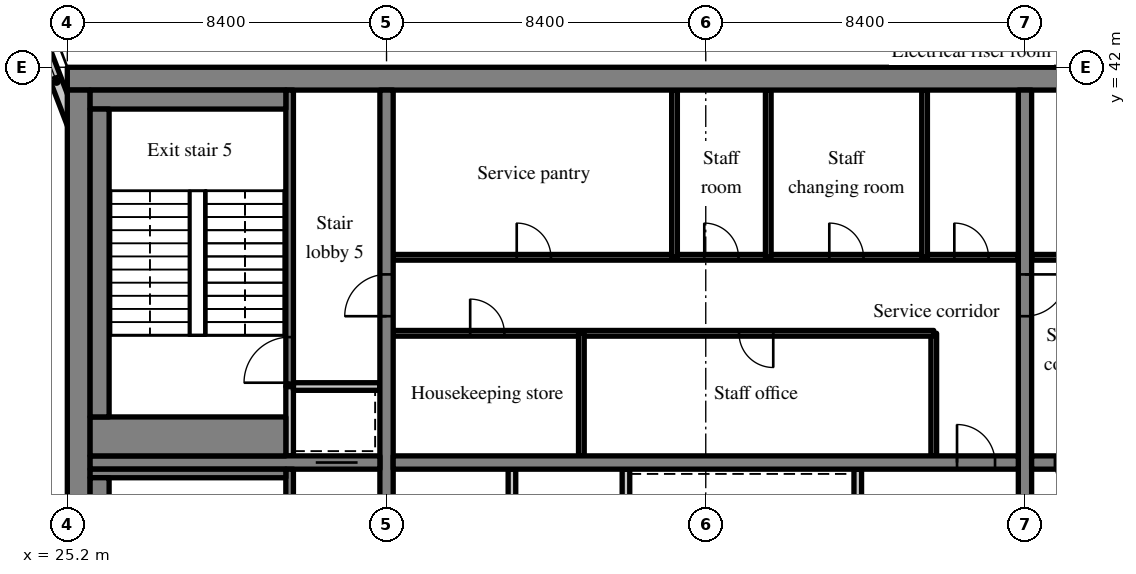
"""IFC4 building model, lengths in metres.
Left out: names, types, materials, properties, quantities, classifications, styles, units other than length and angle.
Written with IfcOpenShell. Run it as: python <this file> out.ifc"""

import sys

from ifc_helpers import new_model, si_unit, direction, frame, frame_2d, origin, place, context, subcontext, project, spatial, rectangle, extrude, source, transform, mapped, element, fill, save


model = new_model("IFC4")
c1 = context("Model", 3, precision=1e-05, world=origin(), true_north=direction((0.0, 1.0)))
c2 = subcontext(c1, "Body", "Model", "MODEL_VIEW")
j1 = project(units=[si_unit("LENGTHUNIT", "METRE"), si_unit("PLANEANGLEUNIT", "RADIAN")], contexts=[c1])
p1 = place(None, origin())
s1 = spatial("IfcSite", under=j1, at=p1, CompositionType="ELEMENT")
p2 = place(p1, origin())
s2 = spatial("IfcBuilding", under=s1, at=p2, CompositionType="ELEMENT")
p3 = place(p2, frame((0.0, 0.0, 221.8)))
s3 = spatial("IfcBuildingStorey", under=s2, at=p3, CompositionType="ELEMENT", Elevation=221.8)
m1 = source(origin(), c2, "Body", "SweptSolid", [
    extrude(rectangle(XDim=50.4, YDim=0.6, at=frame_2d((25.2, 0.0))), origin(), (0.0, 0.0, 1.0), 3.62),
])
p4 = place(p3, frame((25.2, 41.7, 0.0), z_axis=(0.0, 0.0, 1.0), x_axis=(1.0, 0.0, 0.0)))
e1 = element("IfcWall", 1, at=p4, inside=s3, PredefinedType="SHEAR", context=c2, shape_type="MappedRepresentation", body=[
    mapped(m1, transform((0.0, 0.0, 0.0), scale=1.0)),
])
m2 = source(origin(), c2, "Body", "SweptSolid", [
    extrude(rectangle(XDim=18.8, YDim=0.6, at=frame_2d((9.4, 0.0))), origin(), (0.0, 0.0, 1.0), 3.62),
])
p5 = place(p3, frame((25.5, 22.6, 0.0), z_axis=(0.0, 0.0, 1.0), x_axis=(0.0, 1.0, 0.0)))
e2 = element("IfcWall", 2, at=p5, inside=s3, PredefinedType="SHEAR", context=c2, shape_type="MappedRepresentation", body=[
    mapped(m2, transform((0.0, 0.0, 0.0), scale=1.0)),
])
m3 = source(origin(), c2, "Body", "SweptSolid", [
    extrude(rectangle(XDim=18.8, YDim=0.35, at=frame_2d((9.4, 0.0))), origin(), (0.0, 0.0, 1.0), 3.62),
])
p6 = place(p3, frame((33.6, 22.6, 0.0), z_axis=(0.0, 0.0, 1.0), x_axis=(0.0, 1.0, 0.0)))
e3 = element("IfcWall", 3, at=p6, inside=s3, PredefinedType="SHEAR", context=c2, shape_type="MappedRepresentation", body=[
    mapped(m3, transform((0.0, 0.0, 0.0), scale=1.0)),
])
m4 = source(origin(), c2, "Body", "SweptSolid", [
    extrude(rectangle(XDim=1.1, YDim=2.1, at=frame_2d((0.55, 1.05))), frame((0.0, 0.185, 0.0), z_axis=(0.0, -1.0, 0.0), x_axis=(1.0, 0.0, 0.0)), (0.0, 0.0, 1.0), 0.37),
])
p7 = place(p6, frame((12.85, 0.0, 0.0)))
e4 = element("IfcOpeningElement", 4, at=p7, cuts=e3, PredefinedType="OPENING", context=c2, shape_type="MappedRepresentation", body=[
    mapped(m4, transform((0.0, 0.0, 0.0), scale=1.0)),
])
p8 = place(p3, frame((50.4, 22.6, 0.0), z_axis=(0.0, 0.0, 1.0), x_axis=(0.0, 1.0, 0.0)))
e5 = element("IfcWall", 5, at=p8, inside=s3, PredefinedType="SHEAR", context=c2, shape_type="MappedRepresentation", body=[
    mapped(m3, transform((0.0, 0.0, 0.0), scale=1.0)),
])
p9 = place(p8, frame((12.85, 0.0, 0.0)))
e6 = element("IfcOpeningElement", 6, at=p9, cuts=e5, PredefinedType="OPENING", context=c2, shape_type="MappedRepresentation", body=[
    mapped(m4, transform((0.0, 0.0, 0.0), scale=1.0)),
])
m5 = source(origin(), c2, "Body", "SweptSolid", [
    extrude(rectangle(XDim=7.625, YDim=0.35, at=frame_2d((3.812, 0.0))), origin(), (0.0, 0.0, 1.0), 3.62),
])
p10 = place(p3, frame((25.8, 31.6, 0.0), z_axis=(0.0, 0.0, 1.0), x_axis=(1.0, 0.0, 0.0)))
e7 = element("IfcWall", 7, at=p10, inside=s3, PredefinedType="SHEAR", context=c2, shape_type="MappedRepresentation", body=[
    mapped(m5, transform((0.0, 0.0, 0.0), scale=1.0)),
])
p11 = place(p10, frame((5.938, 0.0, 0.0)))
e8 = element("IfcOpeningElement", 8, at=p11, cuts=e7, PredefinedType="OPENING", context=c2, shape_type="MappedRepresentation", body=[
    mapped(m4, transform((0.0, 0.0, 0.0), scale=1.0)),
])
m6 = source(origin(), c2, "Body", "SweptSolid", [
    extrude(rectangle(XDim=16.45, YDim=0.35, at=frame_2d((8.225, 0.0))), origin(), (0.0, 0.0, 1.0), 3.62),
])
p12 = place(p3, frame((33.775, 31.6, 0.0), z_axis=(0.0, 0.0, 1.0), x_axis=(1.0, 0.0, 0.0)))
e9 = element("IfcWall", 9, at=p12, inside=s3, PredefinedType="SHEAR", context=c2, shape_type="MappedRepresentation", body=[
    mapped(m6, transform((0.0, 0.0, 0.0), scale=1.0)),
])
m7 = source(origin(), c2, "Body", "SweptSolid", [
    extrude(rectangle(XDim=1.0, YDim=2.1, at=frame_2d((0.5, 1.05))), frame((0.0, 0.185, 0.0), z_axis=(0.0, -1.0, 0.0), x_axis=(1.0, 0.0, 0.0)), (0.0, 0.0, 1.0), 0.37),
])
p13 = place(p12, frame((14.837, 0.0, 0.0)))
e10 = element("IfcOpeningElement", 10, at=p13, cuts=e9, PredefinedType="OPENING", context=c2, shape_type="MappedRepresentation", body=[
    mapped(m7, transform((0.0, 0.0, 0.0), scale=1.0)),
])
m8 = source(origin(), c2, "Body", "SweptSolid", [
    extrude(rectangle(XDim=16.45, YDim=0.35, at=frame_2d((8.225, 0.0))), origin(), (0.0, 0.0, 1.0), 3.62),
])
p14 = place(p3, frame((50.575, 31.6, 0.0), z_axis=(0.0, 0.0, 1.0), x_axis=(1.0, 0.0, 0.0)))
e11 = element("IfcWall", 11, at=p14, inside=s3, PredefinedType="SHEAR", context=c2, shape_type="MappedRepresentation", body=[
    mapped(m8, transform((0.0, 0.0, 0.0), scale=1.0)),
])
p15 = place(p14, frame((0.613, 0.0, 0.0)))
e12 = element("IfcOpeningElement", 12, at=p15, cuts=e11, PredefinedType="OPENING", context=c2, shape_type="MappedRepresentation", body=[
    mapped(m7, transform((0.0, 0.0, 0.0), scale=1.0)),
])
m9 = source(origin(), c2, "Body", "SweptSolid", [
    extrude(rectangle(XDim=3.559, YDim=0.3, at=frame_2d((1.78, 0.0))), origin(), (0.0, 0.0, 1.0), 3.62),
])
p16 = place(p3, frame((25.55, 39.969, 0.0), z_axis=(0.0, 0.0, 1.0), x_axis=(-0.35779745313, 0.933799219604, 0.0)))
e13 = element("IfcWall", 13, at=p16, inside=s3, PredefinedType="SOLIDWALL", context=c2, shape_type="MappedRepresentation", body=[
    mapped(m9, transform((0.0, 0.0, 0.0), scale=1.0)),
])
m10 = source(origin(), c2, "Body", "SweptSolid", [
    extrude(rectangle(XDim=1.5, YDim=2.0, at=frame_2d((0.75, 1.0))), frame((0.0, 0.16, 0.0), z_axis=(0.0, -1.0, 0.0), x_axis=(1.0, 0.0, 0.0)), (0.0, 0.0, 1.0), 0.32),
])
p17 = place(p16, frame((1.903, 0.0, 0.9)))
e14 = element("IfcOpeningElement", 14, at=p17, cuts=e13, PredefinedType="OPENING", context=c2, shape_type="MappedRepresentation", body=[
    mapped(m10, transform((0.0, 0.0, 0.0), scale=1.0)),
])
m11 = source(origin(), c2, "Body", "SweptSolid", [
    extrude(rectangle(XDim=8.825, YDim=0.2, at=frame_2d((4.413, 0.0))), origin(), (0.0, 0.0, 1.0), 3.62),
])
p18 = place(p3, frame((39.9, 22.6, 0.0), z_axis=(0.0, 0.0, 1.0), x_axis=(0.0, 1.0, 0.0)))
e15 = element("IfcWall", 15, at=p18, inside=s3, PredefinedType="PARTITIONING", context=c2, shape_type="MappedRepresentation", body=[
    mapped(m11, transform((0.0, 0.0, 0.0), scale=1.0)),
])
m12 = source(origin(), c2, "Body", "SweptSolid", [
    extrude(rectangle(XDim=0.9, YDim=2.1, at=frame_2d((0.45, 1.05))), frame((0.0, 0.11, 0.0), z_axis=(0.0, -1.0, 0.0), x_axis=(1.0, 0.0, 0.0)), (0.0, 0.0, 1.0), 0.22),
])
p19 = place(p18, frame((3.95, 0.0, 0.0)))
e16 = element("IfcOpeningElement", 16, at=p19, cuts=e15, PredefinedType="OPENING", context=c2, shape_type="MappedRepresentation", body=[
    mapped(m12, transform((0.0, 0.0, 0.0), scale=1.0)),
])
m13 = source(origin(), c2, "Body", "SweptSolid", [
    extrude(rectangle(XDim=2.625, YDim=0.2, at=frame_2d((1.312, 0.0))), origin(), (0.0, 0.0, 1.0), 3.62),
])
p20 = place(p3, frame((46.0, 28.8, 0.0), z_axis=(0.0, 0.0, 1.0), x_axis=(0.0, 1.0, 0.0)))
e17 = element("IfcWall", 17, at=p20, inside=s3, PredefinedType="SOLIDWALL", context=c2, shape_type="MappedRepresentation", body=[
    mapped(m13, transform((0.0, 0.0, 0.0), scale=1.0)),
])
p21 = place(p3, frame((36.9, 22.6, 0.0), z_axis=(0.0, 0.0, 1.0), x_axis=(0.0, 1.0, 0.0)))
e18 = element("IfcWall", 18, at=p21, inside=s3, PredefinedType="PARTITIONING", context=c2, shape_type="MappedRepresentation", body=[
    mapped(m11, transform((0.0, 0.0, 0.0), scale=1.0)),
])
m14 = source(origin(), c2, "Body", "SweptSolid", [
    extrude(rectangle(XDim=3.225, YDim=0.15, at=frame_2d((1.613, 0.0))), origin(), (0.0, 0.0, 1.0), 3.62),
])
p22 = place(p3, frame((48.0, 31.775, 0.0), z_axis=(0.0, 0.0, 1.0), x_axis=(0.0, 1.0, 0.0)))
e19 = element("IfcWall", 19, at=p22, inside=s3, PredefinedType="PARTITIONING", context=c2, shape_type="MappedRepresentation", body=[
    mapped(m14, transform((0.0, 0.0, 0.0), scale=1.0)),
])
m15 = source(origin(), c2, "Body", "SweptSolid", [
    extrude(rectangle(XDim=14.225, YDim=0.15, at=frame_2d((7.113, 0.0))), origin(), (0.0, 0.0, 1.0), 3.62),
])
p23 = place(p3, frame((33.775, 35.0, 0.0), z_axis=(0.0, 0.0, 1.0), x_axis=(1.0, 0.0, 0.0)))
e20 = element("IfcWall", 20, at=p23, inside=s3, PredefinedType="PARTITIONING", context=c2, shape_type="MappedRepresentation", body=[
    mapped(m15, transform((0.0, 0.0, 0.0), scale=1.0)),
])
m16 = source(origin(), c2, "Body", "SweptSolid", [
    extrude(rectangle(XDim=0.9, YDim=2.1, at=frame_2d((0.45, 1.05))), frame((0.0, 0.085, 0.0), z_axis=(0.0, -1.0, 0.0), x_axis=(1.0, 0.0, 0.0)), (0.0, 0.0, 1.0), 0.17),
])
p24 = place(p23, frame((2.026, 0.0, 0.0)))
e21 = element("IfcOpeningElement", 21, at=p24, cuts=e20, PredefinedType="OPENING", context=c2, shape_type="MappedRepresentation", body=[
    mapped(m16, transform((0.0, 0.0, 0.0), scale=1.0)),
])
p25 = place(p23, frame((9.101, 0.0, 0.0)))
e22 = element("IfcOpeningElement", 22, at=p25, cuts=e20, PredefinedType="OPENING", context=c2, shape_type="MappedRepresentation", body=[
    mapped(m16, transform((0.0, 0.0, 0.0), scale=1.0)),
])
m17 = source(origin(), c2, "Body", "SweptSolid", [
    extrude(rectangle(XDim=16.45, YDim=0.15, at=frame_2d((8.225, 0.0))), origin(), (0.0, 0.0, 1.0), 3.62),
])
p26 = place(p3, frame((33.775, 37.0, 0.0), z_axis=(0.0, 0.0, 1.0), x_axis=(1.0, 0.0, 0.0)))
e23 = element("IfcWall", 23, at=p26, inside=s3, PredefinedType="PARTITIONING", context=c2, shape_type="MappedRepresentation", body=[
    mapped(m17, transform((0.0, 0.0, 0.0), scale=1.0)),
])
p27 = place(p26, frame((3.251, 0.0, 0.0)))
e24 = element("IfcOpeningElement", 24, at=p27, cuts=e23, PredefinedType="OPENING", context=c2, shape_type="MappedRepresentation", body=[
    mapped(m16, transform((0.0, 0.0, 0.0), scale=1.0)),
])
p28 = place(p26, frame((8.186, 0.0, 0.0)))
e25 = element("IfcOpeningElement", 25, at=p28, cuts=e23, PredefinedType="OPENING", context=c2, shape_type="MappedRepresentation", body=[
    mapped(m16, transform((0.0, 0.0, 0.0), scale=1.0)),
])
p29 = place(p26, frame((11.476, 0.0, 0.0)))
e26 = element("IfcOpeningElement", 26, at=p29, cuts=e23, PredefinedType="OPENING", context=c2, shape_type="MappedRepresentation", body=[
    mapped(m16, transform((0.0, 0.0, 0.0), scale=1.0)),
])
p30 = place(p26, frame((14.766, 0.0, 0.0)))
e27 = element("IfcOpeningElement", 27, at=p30, cuts=e23, PredefinedType="OPENING", context=c2, shape_type="MappedRepresentation", body=[
    mapped(m16, transform((0.0, 0.0, 0.0), scale=1.0)),
])
p31 = place(p3, frame((38.727, 31.775, 0.0), z_axis=(0.0, 0.0, 1.0), x_axis=(0.0, 1.0, 0.0)))
e28 = element("IfcWall", 28, at=p31, inside=s3, PredefinedType="PARTITIONING", context=c2, shape_type="MappedRepresentation", body=[
    mapped(m14, transform((0.0, 0.0, 0.0), scale=1.0)),
])
m18 = source(origin(), c2, "Body", "SweptSolid", [
    extrude(rectangle(XDim=4.4, YDim=0.15, at=frame_2d((2.2, 0.0))), origin(), (0.0, 0.0, 1.0), 3.62),
])
for number, where, z_axis, x_axis in (
    (29, (41.178, 37.0, 0.0), (0.0, 0.0, 1.0), (0.0, 1.0, 0.0)),
    (30, (43.645, 37.0, 0.0), (0.0, 0.0, 1.0), (0.0, 1.0, 0.0)),
    (31, (47.758, 37.0, 0.0), (0.0, 0.0, 1.0), (0.0, 1.0, 0.0)),
):
    element("IfcWall", number, at=place(p3, frame(where, z_axis=z_axis, x_axis=x_axis)), inside=s3, PredefinedType="PARTITIONING", context=c2, shape_type="MappedRepresentation", body=[
        mapped(m18, transform((0.0, 0.0, 0.0), scale=1.0)),
    ])
m19 = source(origin(), c2, "Body", "SweptSolid", [
    extrude(rectangle(XDim=16.45, YDim=0.15, at=frame_2d((8.225, 0.0))), origin(), (0.0, 0.0, 1.0), 3.62),
])
p32 = place(p3, frame((67.025, 37.0, 0.0), z_axis=(0.0, 0.0, 1.0), x_axis=(-1.0, 0.0, 0.0)))
e32 = element("IfcWall", 32, at=p32, inside=s3, PredefinedType="PARTITIONING", context=c2, shape_type="MappedRepresentation", body=[
    mapped(m19, transform((0.0, 0.0, 0.0), scale=1.0)),
])
p33 = place(p32, frame((0.784, 0.0, 0.0)))
e33 = element("IfcOpeningElement", 33, at=p33, cuts=e32, PredefinedType="OPENING", context=c2, shape_type="MappedRepresentation", body=[
    mapped(m16, transform((0.0, 0.0, 0.0), scale=1.0)),
])
p34 = place(p32, frame((3.663, 0.0, 0.0)))
e34 = element("IfcOpeningElement", 34, at=p34, cuts=e32, PredefinedType="OPENING", context=c2, shape_type="MappedRepresentation", body=[
    mapped(m16, transform((0.0, 0.0, 0.0), scale=1.0)),
])
p35 = place(p32, frame((9.42, 0.0, 0.0)))
e35 = element("IfcOpeningElement", 35, at=p35, cuts=e32, PredefinedType="OPENING", context=c2, shape_type="MappedRepresentation", body=[
    mapped(m16, transform((0.0, 0.0, 0.0), scale=1.0)),
])
p36 = place(p32, frame((14.766, 0.0, 0.0)))
e36 = element("IfcOpeningElement", 36, at=p36, cuts=e32, PredefinedType="OPENING", context=c2, shape_type="MappedRepresentation", body=[
    mapped(m16, transform((0.0, 0.0, 0.0), scale=1.0)),
])
m20 = source(origin(), c2, "Body", "SweptSolid", [
    extrude(rectangle(XDim=8.825, YDim=0.2, at=frame_2d((4.413, 0.0))), origin(), (0.0, 0.0, 1.0), 3.62),
])
p37 = place(p3, frame((31.05, 22.6, 0.0), z_axis=(0.0, 0.0, 1.0), x_axis=(0.0, 1.0, 0.0)))
e37 = element("IfcWall", 37, at=p37, inside=s3, PredefinedType="SOLIDWALL", context=c2, shape_type="MappedRepresentation", body=[
    mapped(m20, transform((0.0, 0.0, 0.0), scale=1.0)),
])
m21 = source(origin(), c2, "Body", "SweptSolid", [
    extrude(rectangle(XDim=1.2, YDim=2.1, at=frame_2d((0.6, 1.05))), frame((0.0, 0.11, 0.0), z_axis=(0.0, -1.0, 0.0), x_axis=(1.0, 0.0, 0.0)), (0.0, 0.0, 1.0), 0.22),
])
p38 = place(p37, frame((1.0, 0.0, 0.0)))
e38 = element("IfcOpeningElement", 38, at=p38, cuts=e37, PredefinedType="OPENING", context=c2, shape_type="MappedRepresentation", body=[
    mapped(m21, transform((0.0, 0.0, 0.0), scale=1.0)),
])
m22 = source(origin(), c2, "Body", "SweptSolid", [
    extrude(rectangle(XDim=1.825, YDim=0.2, at=frame_2d((0.913, 0.0))), origin(), (0.0, 0.0, 1.0), 3.62),
])
p39 = place(p3, frame((31.05, 31.775, 0.0), z_axis=(0.0, 0.0, 1.0), x_axis=(0.0, 1.0, 0.0)))
e39 = element("IfcWall", 39, at=p39, inside=s3, PredefinedType="SOLIDWALL", context=c2, shape_type="MappedRepresentation", body=[
    mapped(m22, transform((0.0, 0.0, 0.0), scale=1.0)),
])
m23 = source(origin(), c2, "Body", "SweptSolid", [
    extrude(rectangle(XDim=2.275, YDim=0.2, at=frame_2d((1.138, 0.0))), origin(), (0.0, 0.0, 1.0), 3.62),
])
p40 = place(p3, frame((31.15, 33.6, 0.0), z_axis=(0.0, 0.0, 1.0), x_axis=(1.0, 0.0, 0.0)))
e40 = element("IfcWall", 40, at=p40, inside=s3, PredefinedType="SOLIDWALL", context=c2, shape_type="MappedRepresentation", body=[
    mapped(m23, transform((0.0, 0.0, 0.0), scale=1.0)),
])
m24 = source(origin(), c2, "Body", "SweptSolid", [
    extrude(rectangle(XDim=7.8, YDim=0.2, at=frame_2d((3.9, 0.0))), origin(), (0.0, 0.0, 1.0), 3.62),
])
p41 = place(p3, frame((31.05, 33.6, 0.0), z_axis=(0.0, 0.0, 1.0), x_axis=(0.0, 1.0, 0.0)))
e41 = element("IfcWall", 41, at=p41, inside=s3, PredefinedType="SOLIDWALL", context=c2, shape_type="MappedRepresentation", body=[
    mapped(m24, transform((0.0, 0.0, 0.0), scale=1.0)),
])
p42 = place(p41, frame((0.1, 0.0, 0.0)))
e42 = element("IfcOpeningElement", 42, at=p42, cuts=e41, PredefinedType="OPENING", context=c2, shape_type="MappedRepresentation", body=[
    mapped(m21, transform((0.0, 0.0, 0.0), scale=1.0)),
])
m25 = source(origin(), c2, "Body", "SweptSolid", [
    extrude(rectangle(XDim=5.15, YDim=0.225, at=frame_2d((2.575, 0.0))), origin(), (0.0, 0.0, 1.0), 3.62),
])
p43 = place(p3, frame((25.8, 31.312, 0.0), z_axis=(0.0, 0.0, 1.0), x_axis=(1.0, 0.0, 0.0)))
e43 = element("IfcWall", 43, at=p43, inside=s3, PredefinedType="SOLIDWALL", context=c2, shape_type="MappedRepresentation", body=[
    mapped(m25, transform((0.0, 0.0, 0.0), scale=1.0)),
])
m26 = source(origin(), c2, "Body", "SweptSolid", [
    extrude(rectangle(XDim=8.1, YDim=0.5, at=frame_2d((4.05, 0.0))), origin(), (0.0, 0.0, 1.0), 3.62),
])
p44 = place(p3, frame((26.05, 23.1, 0.0), z_axis=(0.0, 0.0, 1.0), x_axis=(0.0, 1.0, 0.0)))
e44 = element("IfcWall", 44, at=p44, inside=s3, PredefinedType="SOLIDWALL", context=c2, shape_type="MappedRepresentation", body=[
    mapped(m26, transform((0.0, 0.0, 0.0), scale=1.0)),
])
m27 = source(origin(), c2, "Body", "SweptSolid", [
    extrude(rectangle(XDim=5.15, YDim=0.5, at=frame_2d((2.575, 0.0))), origin(), (0.0, 0.0, 1.0), 3.62),
])
p45 = place(p3, frame((25.8, 41.15, 0.0), z_axis=(0.0, 0.0, 1.0), x_axis=(1.0, 0.0, 0.0)))
e45 = element("IfcWall", 45, at=p45, inside=s3, PredefinedType="SOLIDWALL", context=c2, shape_type="MappedRepresentation", body=[
    mapped(m27, transform((0.0, 0.0, 0.0), scale=1.0)),
])
m28 = source(origin(), c2, "Body", "SweptSolid", [
    extrude(rectangle(XDim=5.15, YDim=1.025, at=frame_2d((2.575, 0.0))), origin(), (0.0, 0.0, 1.0), 3.62),
])
p46 = place(p3, frame((25.8, 32.287, 0.0), z_axis=(0.0, 0.0, 1.0), x_axis=(1.0, 0.0, 0.0)))
e46 = element("IfcWall", 46, at=p46, inside=s3, PredefinedType="SOLIDWALL", context=c2, shape_type="MappedRepresentation", body=[
    mapped(m28, transform((0.0, 0.0, 0.0), scale=1.0)),
])
p47 = place(p3, frame((26.05, 32.8, 0.0), z_axis=(0.0, 0.0, 1.0), x_axis=(0.0, 1.0, 0.0)))
e47 = element("IfcWall", 47, at=p47, inside=s3, PredefinedType="SOLIDWALL", context=c2, shape_type="MappedRepresentation", body=[
    mapped(m26, transform((0.0, 0.0, 0.0), scale=1.0)),
])
m29 = source(origin(), c2, "Body", "SweptSolid", [
    extrude(rectangle(XDim=1.5, YDim=2.0, at=frame_2d((0.75, 1.0))), frame((0.0, 0.03, 0.0), z_axis=(0.0, -1.0, 0.0), x_axis=(1.0, 0.0, 0.0)), (0.0, 0.0, 1.0), 0.06),
])
p48 = place(p17, origin())
e48 = element("IfcWindow", 48, at=p48, inside=s3, PartitioningType="SINGLE_PANEL", PredefinedType="WINDOW", context=c2, shape_type="MappedRepresentation", body=[
    mapped(m29, transform((0.0, 0.0, 0.0), scale=1.0)),
])
fill(e14, e48)
m30 = source(origin(), c2, "Body", "SweptSolid", [
    extrude(rectangle(XDim=1.0, YDim=2.1, at=frame_2d((0.5, 1.05))), frame((0.0, 0.025, 0.0), z_axis=(0.0, -1.0, 0.0), x_axis=(1.0, 0.0, 0.0)), (0.0, 0.0, 1.0), 0.05),
])
p49 = place(p13, origin())
e49 = element("IfcDoor", 49, at=p49, inside=s3, OperationType="SINGLE_SWING_LEFT", PredefinedType="DOOR", context=c2, shape_type="MappedRepresentation", body=[
    mapped(m30, transform((0.0, 0.0, 0.0), scale=1.0)),
])
fill(e10, e49)
m31 = source(origin(), c2, "Body", "SweptSolid", [
    extrude(rectangle(XDim=0.9, YDim=2.1, at=frame_2d((0.45, 1.05))), frame((0.0, 0.025, 0.0), z_axis=(0.0, -1.0, 0.0), x_axis=(1.0, 0.0, 0.0)), (0.0, 0.0, 1.0), 0.05),
])
p50 = place(p24, origin())
e50 = element("IfcDoor", 50, at=p50, inside=s3, OperationType="SINGLE_SWING_LEFT", PredefinedType="DOOR", context=c2, shape_type="MappedRepresentation", body=[
    mapped(m31, transform((0.0, 0.0, 0.0), scale=1.0)),
])
fill(e21, e50)
p51 = place(p25, origin())
e51 = element("IfcDoor", 51, at=p51, inside=s3, OperationType="SINGLE_SWING_RIGHT", PredefinedType="DOOR", context=c2, shape_type="MappedRepresentation", body=[
    mapped(m31, transform((0.0, 0.0, 0.0), scale=1.0)),
])
fill(e22, e51)
p52 = place(p27, origin())
e52 = element("IfcDoor", 52, at=p52, inside=s3, OperationType="SINGLE_SWING_LEFT", PredefinedType="DOOR", context=c2, shape_type="MappedRepresentation", body=[
    mapped(m31, transform((0.0, 0.0, 0.0), scale=1.0)),
])
fill(e24, e52)
p53 = place(p28, origin())
e53 = element("IfcDoor", 53, at=p53, inside=s3, OperationType="SINGLE_SWING_LEFT", PredefinedType="DOOR", context=c2, shape_type="MappedRepresentation", body=[
    mapped(m31, transform((0.0, 0.0, 0.0), scale=1.0)),
])
fill(e25, e53)
p54 = place(p29, origin())
e54 = element("IfcDoor", 54, at=p54, inside=s3, OperationType="SINGLE_SWING_LEFT", PredefinedType="DOOR", context=c2, shape_type="MappedRepresentation", body=[
    mapped(m31, transform((0.0, 0.0, 0.0), scale=1.0)),
])
fill(e26, e54)
p55 = place(p30, origin())
e55 = element("IfcDoor", 55, at=p55, inside=s3, OperationType="SINGLE_SWING_LEFT", PredefinedType="DOOR", context=c2, shape_type="MappedRepresentation", body=[
    mapped(m31, transform((0.0, 0.0, 0.0), scale=1.0)),
])
fill(e27, e55)
p56 = place(p15, origin())
e56 = element("IfcDoor", 56, at=p56, inside=s3, OperationType="SINGLE_SWING_RIGHT", PredefinedType="DOOR", context=c2, shape_type="MappedRepresentation", body=[
    mapped(m30, transform((0.0, 0.0, 0.0), scale=1.0)),
])
fill(e12, e56)
m32 = source(origin(), c2, "Body", "SweptSolid", [
    extrude(rectangle(XDim=1.1, YDim=2.1, at=frame_2d((0.55, 1.05))), frame((0.0, 0.025, 0.0), z_axis=(0.0, -1.0, 0.0), x_axis=(1.0, 0.0, 0.0)), (0.0, 0.0, 1.0), 0.05),
])
p57 = place(p11, origin())
e57 = element("IfcDoor", 57, at=p57, inside=s3, OperationType="SLIDING_TO_LEFT", PredefinedType="DOOR", context=c2, shape_type="MappedRepresentation", body=[
    mapped(m32, transform((0.0, 0.0, 0.0), scale=1.0)),
])
fill(e8, e57)
m33 = source(origin(), c2, "Body", "SweptSolid", [
    extrude(rectangle(XDim=1.2, YDim=2.1, at=frame_2d((0.6, 1.05))), frame((0.0, 0.025, 0.0), z_axis=(0.0, -1.0, 0.0), x_axis=(1.0, 0.0, 0.0)), (0.0, 0.0, 1.0), 0.05),
])
p58 = place(p42, origin())
e58 = element("IfcDoor", 58, at=p58, inside=s3, OperationType="SINGLE_SWING_LEFT", PredefinedType="DOOR", context=c2, shape_type="MappedRepresentation", body=[
    mapped(m33, transform((0.0, 0.0, 0.0), scale=1.0)),
])
fill(e42, e58)
p59 = place(p7, origin())
e59 = element("IfcDoor", 59, at=p59, inside=s3, OperationType="SINGLE_SWING_LEFT", PredefinedType="DOOR", context=c2, shape_type="MappedRepresentation", body=[
    mapped(m32, transform((0.0, 0.0, 0.0), scale=1.0)),
])
fill(e4, e59)
p60 = place(p9, origin())
e60 = element("IfcDoor", 60, at=p60, inside=s3, OperationType="SINGLE_SWING_RIGHT", PredefinedType="DOOR", context=c2, shape_type="MappedRepresentation", body=[
    mapped(m32, transform((0.0, 0.0, 0.0), scale=1.0)),
])
fill(e6, e60)
save(model, sys.argv[1])
